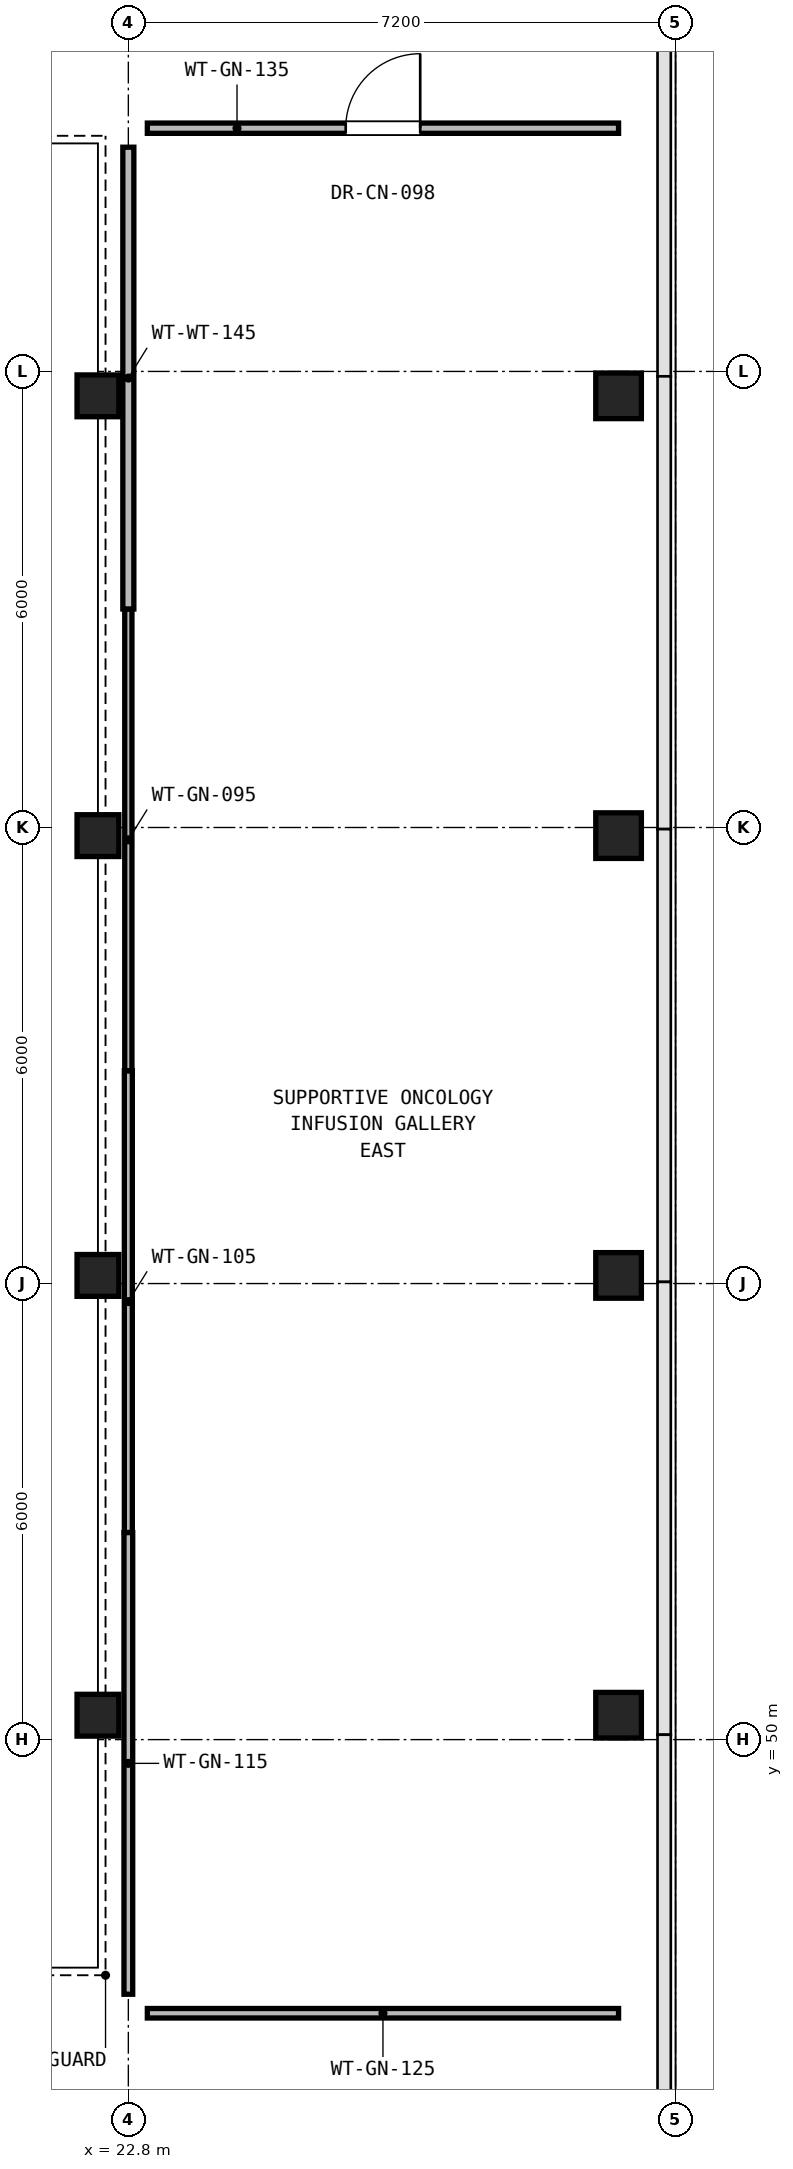
"""IFC4 building model, lengths in metres.
Left out: names, types, materials, properties, quantities, classifications, styles, units other than length and angle.
Written with IfcOpenShell. Run it as: python <this file> out.ifc"""

import sys

from ifc_helpers import new_model, si_unit, direction, frame, frame_2d, origin, origin_2d, place, context, subcontext, project, spatial, rectangle, circle, extrude, element, fill, save


model = new_model("IFC4")
c1 = context("Model", 3, precision=1e-05, world=origin(), true_north=direction((0.0, 1.0)))
c2 = subcontext(c1, "Body", "Model", "MODEL_VIEW")
j1 = project(units=[si_unit("LENGTHUNIT", "METRE"), si_unit("PLANEANGLEUNIT", "RADIAN")], contexts=[c1])
p1 = place(None, origin())
s1 = spatial("IfcSite", under=j1, at=p1, CompositionType="ELEMENT")
p2 = place(p1, origin())
s2 = spatial("IfcBuilding", under=s1, at=p2, CompositionType="ELEMENT")
p3 = place(p2, frame((0.0, 0.0, 5.1)))
s3 = spatial("IfcBuildingStorey", under=s2, at=p3, CompositionType="ELEMENT", Elevation=5.1)
for number, where, z_axis, x_axis in (
    (1, (22.4, 50.321, 0.0), (0.0, 0.0, 1.0), (1.0, 0.0, 0.0)),
    (2, (22.4, 56.107, 0.0), (0.0, 0.0, 1.0), (1.0, 0.0, 0.0)),
    (3, (22.4, 61.893, 0.0), (0.0, 0.0, 1.0), (1.0, 0.0, 0.0)),
    (4, (22.4, 67.679, 0.0), (0.0, 0.0, 1.0), (1.0, 0.0, 0.0)),
):
    element("IfcColumn", number, at=place(p3, frame(where, z_axis=z_axis, x_axis=x_axis)), inside=s3, PredefinedType="COLUMN", context=c2, shape_type="SweptSolid", body=[
        extrude(rectangle(XDim=0.55, YDim=0.55, at=origin_2d()), origin(), (0.0, 0.0, 1.0), 4.42),
    ])
for number, where, z_axis, x_axis in (
    (5, (29.25, 50.321, 0.0), (0.0, 0.0, 1.0), (1.0, 0.0, 0.0)),
    (6, (29.25, 56.107, 0.0), (0.0, 0.0, 1.0), (1.0, 0.0, 0.0)),
    (7, (29.25, 61.893, 0.0), (0.0, 0.0, 1.0), (1.0, 0.0, 0.0)),
    (8, (29.25, 67.679, 0.0), (0.0, 0.0, 1.0), (1.0, 0.0, 0.0)),
):
    element("IfcColumn", number, at=place(p3, frame(where, z_axis=z_axis, x_axis=x_axis)), inside=s3, PredefinedType="COLUMN", context=c2, shape_type="SweptSolid", body=[
        extrude(circle(Radius=0.3, at=origin_2d()), origin(), (0.0, 0.0, 1.0), 4.42),
    ])
p4 = place(p3, frame((22.8, 46.65, 0.0), z_axis=(0.0, 0.0, 1.0), x_axis=(0.0, 1.0, 0.0)))
e9 = element("IfcWall", 9, at=p4, inside=s3, PredefinedType="PARTITIONING", context=c2, shape_type="SweptSolid", body=[
    extrude(rectangle(XDim=6.075, YDim=0.115, at=frame_2d((3.038, 0.0))), origin(), (0.0, 0.0, 1.0), 3.583),
])
p5 = place(p3, frame((22.8, 52.725, 0.0), z_axis=(0.0, 0.0, 1.0), x_axis=(0.0, 1.0, 0.0)))
e10 = element("IfcWall", 10, at=p5, inside=s3, PredefinedType="PARTITIONING", context=c2, shape_type="SweptSolid", body=[
    extrude(rectangle(XDim=6.075, YDim=0.105, at=frame_2d((3.038, 0.0))), origin(), (0.0, 0.0, 1.0), 3.583),
])
p6 = place(p3, frame((22.8, 58.8, 0.0), z_axis=(0.0, 0.0, 1.0), x_axis=(0.0, 1.0, 0.0)))
e11 = element("IfcWall", 11, at=p6, inside=s3, PredefinedType="PARTITIONING", context=c2, shape_type="SweptSolid", body=[
    extrude(rectangle(XDim=6.075, YDim=0.095, at=frame_2d((3.038, 0.0))), origin(), (0.0, 0.0, 1.0), 3.583),
])
p7 = place(p3, frame((22.8, 64.875, 0.0), z_axis=(0.0, 0.0, 1.0), x_axis=(0.0, 1.0, 0.0)))
e12 = element("IfcWall", 12, at=p7, inside=s3, PredefinedType="PARTITIONING", context=c2, shape_type="SweptSolid", body=[
    extrude(rectangle(XDim=6.075, YDim=0.145, at=frame_2d((3.038, 0.0))), origin(), (0.0, 0.0, 1.0), 3.583),
])
p8 = place(p3, frame((23.05, 71.2, 0.0), z_axis=(0.0, 0.0, 1.0), x_axis=(1.0, 0.0, 0.0)))
e13 = element("IfcWall", 13, at=p8, inside=s3, PredefinedType="PARTITIONING", context=c2, shape_type="SweptSolid", body=[
    extrude(rectangle(XDim=6.2, YDim=0.135, at=frame_2d((3.1, 0.0))), origin(), (0.0, 0.0, 1.0), 3.583),
])
p9 = place(p8, frame((2.61, 0.0, 0.0)))
e14 = element("IfcOpeningElement", 14, at=p9, cuts=e13, PredefinedType="OPENING", context=c2, shape_type="SweptSolid", body=[
    extrude(rectangle(XDim=0.98, YDim=2.15, at=frame_2d((0.49, 1.075))), frame((0.0, 0.077, 0.0), z_axis=(0.0, -1.0, 0.0), x_axis=(1.0, 0.0, 0.0)), (0.0, 0.0, 1.0), 0.155),
])
p10 = place(p3, frame((29.25, 46.4, 0.0), z_axis=(0.0, 0.0, 1.0), x_axis=(-1.0, 0.0, 0.0)))
e15 = element("IfcWall", 15, at=p10, inside=s3, PredefinedType="PARTITIONING", context=c2, shape_type="SweptSolid", body=[
    extrude(rectangle(XDim=6.2, YDim=0.125, at=frame_2d((3.1, 0.0))), origin(), (0.0, 0.0, 1.0), 3.583),
])
p11 = place(p9, origin())
e16 = element("IfcDoor", 16, at=p11, inside=s3, OperationType="SINGLE_SWING_RIGHT", PredefinedType="DOOR", context=c2, shape_type="SweptSolid", body=[
    extrude(rectangle(XDim=0.98, YDim=2.15, at=frame_2d((0.49, 1.075))), frame((0.0, 0.025, 0.0), z_axis=(0.0, -1.0, 0.0), x_axis=(1.0, 0.0, 0.0)), (0.0, 0.0, 1.0), 0.05),
])
fill(e14, e16)
save(model, sys.argv[1])
